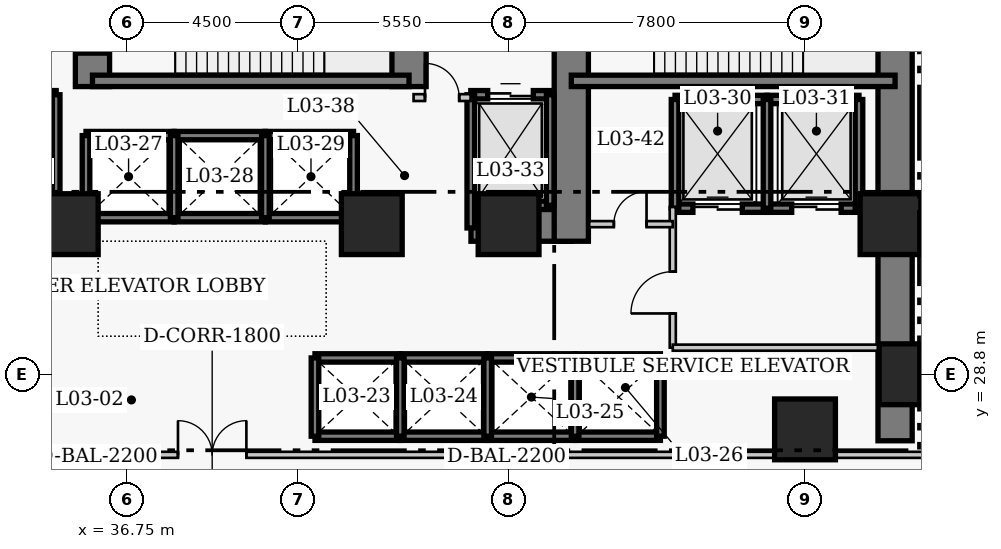
"""IFC4 building model, lengths in metres.
Left out: names, types, materials, properties, quantities, classifications, styles, units other than length and angle.
Written with IfcOpenShell. Run it as: python <this file> out.ifc"""

import sys

from ifc_helpers import new_model, si_unit, direction, frame, frame_2d, origin, origin_2d, place, context, subcontext, project, spatial, rectangle, extrude, element, fill, save


model = new_model("IFC4")
c1 = context("Model", 3, precision=1e-05, world=origin(), true_north=direction((0.0, 1.0)))
c2 = subcontext(c1, "Body", "Model", "MODEL_VIEW")
j1 = project(units=[si_unit("LENGTHUNIT", "METRE"), si_unit("PLANEANGLEUNIT", "RADIAN")], contexts=[c1])
p1 = place(None, origin())
s1 = spatial("IfcSite", under=j1, at=p1, CompositionType="ELEMENT")
p2 = place(p1, origin())
s2 = spatial("IfcBuilding", under=s1, at=p2, CompositionType="ELEMENT")
p3 = place(p2, frame((0.0, 0.0, 15.8)))
s3 = spatial("IfcBuildingStorey", under=s2, at=p3, CompositionType="ELEMENT", Elevation=15.8)
p4 = place(p3, frame((56.97, 27.05, 0.0), z_axis=(0.0, 0.0, 1.0), x_axis=(0.0, 1.0, 0.0)))
e1 = element("IfcWall", 1, at=p4, inside=s3, PredefinedType="SHEAR", context=c2, shape_type="SweptSolid", body=[
    extrude(rectangle(XDim=13.72, YDim=0.9, at=frame_2d((6.86, 0.0))), origin(), (0.0, 0.0, 1.0), 5.0),
])
p5 = place(p3, frame((45.81, 32.75, 0.0), z_axis=(0.0, 0.0, 1.0), x_axis=(1.0, 0.0, 0.0)))
e2 = element("IfcWall", 2, at=p5, inside=s3, PredefinedType="SHEAR", context=c2, shape_type="SweptSolid", body=[
    extrude(rectangle(XDim=2.64, YDim=0.9, at=frame_2d((1.32, 0.0))), origin(), (0.0, 0.0, 1.0), 5.0),
])
p6 = place(p3, frame((35.85, 36.37, 0.0), z_axis=(0.0, 0.0, 1.0), x_axis=(0.0, 1.0, 0.0)))
e3 = element("IfcWall", 3, at=p6, inside=s3, PredefinedType="SHEAR", context=c2, shape_type="SweptSolid", body=[
    extrude(rectangle(XDim=3.95, YDim=0.9, at=frame_2d((1.975, 0.0))), origin(), (0.0, 0.0, 1.0), 5.0),
])
p7 = place(p6, frame((0.88, 0.0, 0.0)))
e4 = element("IfcOpeningElement", 4, at=p7, cuts=e3, PredefinedType="OPENING", context=c2, shape_type="SweptSolid", body=[
    extrude(rectangle(XDim=1.1, YDim=2.15, at=frame_2d((0.55, 1.075))), frame((0.0, 0.46, 0.0), z_axis=(0.0, -1.0, 0.0), x_axis=(1.0, 0.0, 0.0)), (0.0, 0.0, 1.0), 0.92),
])
p8 = place(p3, frame((44.18, 36.37, 0.0), z_axis=(0.0, 0.0, 1.0), x_axis=(0.0, 1.0, 0.0)))
e5 = element("IfcWall", 5, at=p8, inside=s3, PredefinedType="SHEAR", context=c2, shape_type="SweptSolid", body=[
    extrude(rectangle(XDim=3.95, YDim=0.9, at=frame_2d((1.975, 0.0))), origin(), (0.0, 0.0, 1.0), 5.0),
])
p9 = place(p3, frame((48.45, 32.3, 0.0), z_axis=(0.0, 0.0, 1.0), x_axis=(0.0, 1.0, 0.0)))
e6 = element("IfcWall", 6, at=p9, inside=s3, PredefinedType="SHEAR", context=c2, shape_type="SweptSolid", body=[
    extrude(rectangle(XDim=8.02, YDim=0.9, at=frame_2d((4.01, 0.0))), origin(), (0.0, 0.0, 1.0), 5.0),
])
p10 = place(p9, frame((5.9, 0.0, 0.0)))
e7 = element("IfcOpeningElement", 7, at=p10, cuts=e6, PredefinedType="OPENING", context=c2, shape_type="SweptSolid", body=[
    extrude(rectangle(XDim=1.1, YDim=2.15, at=frame_2d((0.55, 1.075))), frame((0.0, 0.46, 0.0), z_axis=(0.0, -1.0, 0.0), x_axis=(1.0, 0.0, 0.0)), (0.0, 0.0, 1.0), 0.92),
])
p11 = place(p3, frame((35.85, 36.52, 0.0), z_axis=(0.0, 0.0, 1.0), x_axis=(1.0, 0.0, 0.0)))
e8 = element("IfcWall", 8, at=p11, inside=s3, PredefinedType="SHEAR", context=c2, shape_type="SweptSolid", body=[
    extrude(rectangle(XDim=8.33, YDim=0.3, at=frame_2d((4.165, 0.0))), origin(), (0.0, 0.0, 1.0), 5.0),
])
p12 = place(p3, frame((48.45, 36.52, 0.0), z_axis=(0.0, 0.0, 1.0), x_axis=(1.0, 0.0, 0.0)))
e9 = element("IfcWall", 9, at=p12, inside=s3, PredefinedType="SHEAR", context=c2, shape_type="SweptSolid", body=[
    extrude(rectangle(XDim=8.52, YDim=0.3, at=frame_2d((4.26, 0.0))), origin(), (0.0, 0.0, 1.0), 5.0),
])
for number, where, z_axis, x_axis in (
    (10, (57.35, 28.8, 0.0), (0.0, 0.0, 1.0), (1.0, 0.0, 0.0)),
    (11, (35.2, 32.75, 0.0), (0.0, 0.0, 1.0), (1.0, 0.0, 0.0)),
    (12, (43.2, 32.75, 0.0), (0.0, 0.0, 1.0), (1.0, 0.0, 0.0)),
    (13, (46.8, 32.75, 0.0), (0.0, 0.0, 1.0), (1.0, 0.0, 0.0)),
    (14, (54.6, 27.35, 0.0), (0.0, 0.0, 1.0), (1.0, 0.0, 0.0)),
    (15, (56.85, 32.75, 0.0), (0.0, 0.0, 1.0), (1.0, 0.0, 0.0)),
):
    element("IfcColumn", number, at=place(p3, frame(where, z_axis=z_axis, x_axis=x_axis)), inside=s3, PredefinedType="COLUMN", context=c2, shape_type="SweptSolid", body=[
        extrude(rectangle(XDim=1.6, YDim=1.6, at=origin_2d()), origin(), (0.0, 0.0, 1.0), 5.0),
    ])
for number, where, z_axis, x_axis in (
    (16, (41.705, 29.23, 0.0), (0.0, 0.0, 1.0), (1.0, 0.0, 0.0)),
    (17, (41.705, 27.17, 0.0), (0.0, 0.0, 1.0), (1.0, 0.0, 0.0)),
):
    element("IfcWall", number, at=place(p3, frame(where, z_axis=z_axis, x_axis=x_axis)), inside=s3, PredefinedType="SHEAR", context=c2, shape_type="SweptSolid", body=[
        extrude(rectangle(XDim=2.245, YDim=0.22, at=frame_2d((1.123, 0.0))), origin(), (0.0, 0.0, 1.0), 5.0),
    ])
p13 = place(p3, frame((41.705, 27.17, 0.0), z_axis=(0.0, 0.0, 1.0), x_axis=(0.0, 1.0, 0.0)))
e18 = element("IfcWall", 18, at=p13, inside=s3, PredefinedType="SHEAR", context=c2, shape_type="SweptSolid", body=[
    extrude(rectangle(XDim=2.06, YDim=0.2, at=frame_2d((1.03, 0.0))), origin(), (0.0, 0.0, 1.0), 5.0),
])
for number, where, z_axis, x_axis in (
    (19, (43.95, 29.23, 0.0), (0.0, 0.0, 1.0), (1.0, 0.0, 0.0)),
    (20, (43.95, 27.17, 0.0), (0.0, 0.0, 1.0), (1.0, 0.0, 0.0)),
):
    element("IfcWall", number, at=place(p3, frame(where, z_axis=z_axis, x_axis=x_axis)), inside=s3, PredefinedType="SHEAR", context=c2, shape_type="SweptSolid", body=[
        extrude(rectangle(XDim=2.3, YDim=0.22, at=frame_2d((1.15, 0.0))), origin(), (0.0, 0.0, 1.0), 5.0),
    ])
p14 = place(p3, frame((43.95, 27.17, 0.0), z_axis=(0.0, 0.0, 1.0), x_axis=(0.0, 1.0, 0.0)))
e21 = element("IfcWall", 21, at=p14, inside=s3, PredefinedType="SHEAR", context=c2, shape_type="SweptSolid", body=[
    extrude(rectangle(XDim=2.06, YDim=0.2, at=frame_2d((1.03, 0.0))), origin(), (0.0, 0.0, 1.0), 5.0),
])
for number, where, z_axis, x_axis in (
    (22, (46.25, 29.23, 0.0), (0.0, 0.0, 1.0), (1.0, 0.0, 0.0)),
    (23, (46.25, 27.17, 0.0), (0.0, 0.0, 1.0), (1.0, 0.0, 0.0)),
):
    element("IfcWall", number, at=place(p3, frame(where, z_axis=z_axis, x_axis=x_axis)), inside=s3, PredefinedType="SHEAR", context=c2, shape_type="SweptSolid", body=[
        extrude(rectangle(XDim=2.3, YDim=0.22, at=frame_2d((1.15, 0.0))), origin(), (0.0, 0.0, 1.0), 5.0),
    ])
p15 = place(p3, frame((46.25, 27.17, 0.0), z_axis=(0.0, 0.0, 1.0), x_axis=(0.0, 1.0, 0.0)))
e24 = element("IfcWall", 24, at=p15, inside=s3, PredefinedType="SHEAR", context=c2, shape_type="SweptSolid", body=[
    extrude(rectangle(XDim=2.06, YDim=0.2, at=frame_2d((1.03, 0.0))), origin(), (0.0, 0.0, 1.0), 5.0),
])
for number, where, z_axis, x_axis in (
    (25, (48.55, 29.23, 0.0), (0.0, 0.0, 1.0), (1.0, 0.0, 0.0)),
    (26, (48.55, 27.17, 0.0), (0.0, 0.0, 1.0), (1.0, 0.0, 0.0)),
):
    element("IfcWall", number, at=place(p3, frame(where, z_axis=z_axis, x_axis=x_axis)), inside=s3, PredefinedType="SHEAR", context=c2, shape_type="SweptSolid", body=[
        extrude(rectangle(XDim=2.245, YDim=0.22, at=frame_2d((1.123, 0.0))), origin(), (0.0, 0.0, 1.0), 5.0),
    ])
for number, where, z_axis, x_axis in (
    (27, (48.55, 27.17, 0.0), (0.0, 0.0, 1.0), (0.0, 1.0, 0.0)),
    (28, (50.795, 27.17, 0.0), (0.0, 0.0, 1.0), (0.0, 1.0, 0.0)),
):
    element("IfcWall", number, at=place(p3, frame(where, z_axis=z_axis, x_axis=x_axis)), inside=s3, PredefinedType="SHEAR", context=c2, shape_type="SweptSolid", body=[
        extrude(rectangle(XDim=2.06, YDim=0.2, at=frame_2d((1.03, 0.0))), origin(), (0.0, 0.0, 1.0), 5.0),
    ])
for number, where, z_axis, x_axis in (
    (29, (35.68, 35.08, 0.0), (0.0, 0.0, 1.0), (1.0, 0.0, 0.0)),
    (30, (35.68, 32.92, 0.0), (0.0, 0.0, 1.0), (1.0, 0.0, 0.0)),
):
    element("IfcWall", number, at=place(p3, frame(where, z_axis=z_axis, x_axis=x_axis)), inside=s3, PredefinedType="SHEAR", context=c2, shape_type="SweptSolid", body=[
        extrude(rectangle(XDim=2.32, YDim=0.22, at=frame_2d((1.16, 0.0))), origin(), (0.0, 0.0, 1.0), 5.0),
    ])
p16 = place(p3, frame((35.68, 32.92, 0.0), z_axis=(0.0, 0.0, 1.0), x_axis=(0.0, 1.0, 0.0)))
e31 = element("IfcWall", 31, at=p16, inside=s3, PredefinedType="SHEAR", context=c2, shape_type="SweptSolid", body=[
    extrude(rectangle(XDim=2.16, YDim=0.2, at=frame_2d((1.08, 0.0))), origin(), (0.0, 0.0, 1.0), 5.0),
])
for number, where, z_axis, x_axis in (
    (32, (38.0, 35.08, 0.0), (0.0, 0.0, 1.0), (1.0, 0.0, 0.0)),
    (33, (38.0, 32.92, 0.0), (0.0, 0.0, 1.0), (1.0, 0.0, 0.0)),
):
    element("IfcWall", number, at=place(p3, frame(where, z_axis=z_axis, x_axis=x_axis)), inside=s3, PredefinedType="SHEAR", context=c2, shape_type="SweptSolid", body=[
        extrude(rectangle(XDim=2.4, YDim=0.22, at=frame_2d((1.2, 0.0))), origin(), (0.0, 0.0, 1.0), 5.0),
    ])
p17 = place(p3, frame((38.0, 32.92, 0.0), z_axis=(0.0, 0.0, 1.0), x_axis=(0.0, 1.0, 0.0)))
e34 = element("IfcWall", 34, at=p17, inside=s3, PredefinedType="SHEAR", context=c2, shape_type="SweptSolid", body=[
    extrude(rectangle(XDim=2.16, YDim=0.2, at=frame_2d((1.08, 0.0))), origin(), (0.0, 0.0, 1.0), 5.0),
])
for number, where, z_axis, x_axis in (
    (35, (40.4, 35.08, 0.0), (0.0, 0.0, 1.0), (1.0, 0.0, 0.0)),
    (36, (40.4, 32.92, 0.0), (0.0, 0.0, 1.0), (1.0, 0.0, 0.0)),
):
    element("IfcWall", number, at=place(p3, frame(where, z_axis=z_axis, x_axis=x_axis)), inside=s3, PredefinedType="SHEAR", context=c2, shape_type="SweptSolid", body=[
        extrude(rectangle(XDim=2.32, YDim=0.22, at=frame_2d((1.16, 0.0))), origin(), (0.0, 0.0, 1.0), 5.0),
    ])
for number, where, z_axis, x_axis in (
    (37, (40.4, 32.92, 0.0), (0.0, 0.0, 1.0), (0.0, 1.0, 0.0)),
    (38, (42.72, 32.92, 0.0), (0.0, 0.0, 1.0), (0.0, 1.0, 0.0)),
):
    element("IfcWall", number, at=place(p3, frame(where, z_axis=z_axis, x_axis=x_axis)), inside=s3, PredefinedType="SHEAR", context=c2, shape_type="SweptSolid", body=[
        extrude(rectangle(XDim=2.16, YDim=0.2, at=frame_2d((1.08, 0.0))), origin(), (0.0, 0.0, 1.0), 5.0),
    ])
p18 = place(p3, frame((51.18, 36.03, 0.0), z_axis=(0.0, 0.0, 1.0), x_axis=(1.0, 0.0, 0.0)))
e39 = element("IfcWall", 39, at=p18, inside=s3, PredefinedType="SHEAR", context=c2, shape_type="SweptSolid", body=[
    extrude(rectangle(XDim=2.42, YDim=0.22, at=frame_2d((1.21, 0.0))), origin(), (0.0, 0.0, 1.0), 5.0),
])
p19 = place(p3, frame((51.18, 33.17, 0.0), z_axis=(0.0, 0.0, 1.0), x_axis=(1.0, 0.0, 0.0)))
e40 = element("IfcWall", 40, at=p19, inside=s3, PredefinedType="SHEAR", context=c2, shape_type="SweptSolid", body=[
    extrude(rectangle(XDim=2.42, YDim=0.22, at=frame_2d((1.21, 0.0))), origin(), (0.0, 0.0, 1.0), 5.0),
])
p20 = place(p19, frame((0.47, 0.0, 0.0)))
e41 = element("IfcOpeningElement", 41, at=p20, cuts=e40, PredefinedType="OPENING", context=c2, shape_type="SweptSolid", body=[
    extrude(rectangle(XDim=1.3, YDim=2.15, at=frame_2d((0.65, 1.075))), frame((0.0, 0.12, 0.0), z_axis=(0.0, -1.0, 0.0), x_axis=(1.0, 0.0, 0.0)), (0.0, 0.0, 1.0), 0.24),
])
p21 = place(p3, frame((51.18, 33.17, 0.0), z_axis=(0.0, 0.0, 1.0), x_axis=(0.0, 1.0, 0.0)))
e42 = element("IfcWall", 42, at=p21, inside=s3, PredefinedType="SHEAR", context=c2, shape_type="SweptSolid", body=[
    extrude(rectangle(XDim=2.86, YDim=0.2, at=frame_2d((1.43, 0.0))), origin(), (0.0, 0.0, 1.0), 5.0),
])
p22 = place(p3, frame((53.6, 36.03, 0.0), z_axis=(0.0, 0.0, 1.0), x_axis=(1.0, 0.0, 0.0)))
e43 = element("IfcWall", 43, at=p22, inside=s3, PredefinedType="SHEAR", context=c2, shape_type="SweptSolid", body=[
    extrude(rectangle(XDim=2.42, YDim=0.22, at=frame_2d((1.21, 0.0))), origin(), (0.0, 0.0, 1.0), 5.0),
])
p23 = place(p3, frame((53.6, 33.17, 0.0), z_axis=(0.0, 0.0, 1.0), x_axis=(1.0, 0.0, 0.0)))
e44 = element("IfcWall", 44, at=p23, inside=s3, PredefinedType="SHEAR", context=c2, shape_type="SweptSolid", body=[
    extrude(rectangle(XDim=2.42, YDim=0.22, at=frame_2d((1.21, 0.0))), origin(), (0.0, 0.0, 1.0), 5.0),
])
p24 = place(p23, frame((0.65, 0.0, 0.0)))
e45 = element("IfcOpeningElement", 45, at=p24, cuts=e44, PredefinedType="OPENING", context=c2, shape_type="SweptSolid", body=[
    extrude(rectangle(XDim=1.3, YDim=2.15, at=frame_2d((0.65, 1.075))), frame((0.0, 0.12, 0.0), z_axis=(0.0, -1.0, 0.0), x_axis=(1.0, 0.0, 0.0)), (0.0, 0.0, 1.0), 0.24),
])
for number, where, z_axis, x_axis in (
    (46, (53.6, 33.17, 0.0), (0.0, 0.0, 1.0), (0.0, 1.0, 0.0)),
    (47, (56.02, 33.17, 0.0), (0.0, 0.0, 1.0), (0.0, 1.0, 0.0)),
):
    element("IfcWall", number, at=place(p3, frame(where, z_axis=z_axis, x_axis=x_axis)), inside=s3, PredefinedType="SHEAR", context=c2, shape_type="SweptSolid", body=[
        extrude(rectangle(XDim=2.86, YDim=0.2, at=frame_2d((1.43, 0.0))), origin(), (0.0, 0.0, 1.0), 5.0),
    ])
p25 = place(p3, frame((32.805, 36.155, 0.0), z_axis=(0.0, 0.0, 1.0), x_axis=(1.0, 0.0, 0.0)))
e48 = element("IfcWall", 48, at=p25, inside=s3, PredefinedType="SHEAR", context=c2, shape_type="SweptSolid", body=[
    extrude(rectangle(XDim=2.09, YDim=0.22, at=frame_2d((1.045, 0.0))), origin(), (0.0, 0.0, 1.0), 5.0),
])
p26 = place(p25, frame((0.445, 0.0, 0.0)))
e49 = element("IfcOpeningElement", 49, at=p26, cuts=e48, PredefinedType="OPENING", context=c2, shape_type="SweptSolid", body=[
    extrude(rectangle(XDim=1.2, YDim=2.15, at=frame_2d((0.6, 1.075))), frame((0.0, 0.12, 0.0), z_axis=(0.0, -1.0, 0.0), x_axis=(1.0, 0.0, 0.0)), (0.0, 0.0, 1.0), 0.24),
])
p27 = place(p3, frame((32.805, 33.245, 0.0), z_axis=(0.0, 0.0, 1.0), x_axis=(1.0, 0.0, 0.0)))
e50 = element("IfcWall", 50, at=p27, inside=s3, PredefinedType="SHEAR", context=c2, shape_type="SweptSolid", body=[
    extrude(rectangle(XDim=2.09, YDim=0.22, at=frame_2d((1.045, 0.0))), origin(), (0.0, 0.0, 1.0), 5.0),
])
p28 = place(p3, frame((34.895, 33.245, 0.0), z_axis=(0.0, 0.0, 1.0), x_axis=(0.0, 1.0, 0.0)))
e51 = element("IfcWall", 51, at=p28, inside=s3, PredefinedType="SHEAR", context=c2, shape_type="SweptSolid", body=[
    extrude(rectangle(XDim=2.91, YDim=0.2, at=frame_2d((1.455, 0.0))), origin(), (0.0, 0.0, 1.0), 5.0),
])
p29 = place(p3, frame((45.805, 36.155, 0.0), z_axis=(0.0, 0.0, 1.0), x_axis=(1.0, 0.0, 0.0)))
e52 = element("IfcWall", 52, at=p29, inside=s3, PredefinedType="SHEAR", context=c2, shape_type="SweptSolid", body=[
    extrude(rectangle(XDim=2.09, YDim=0.22, at=frame_2d((1.045, 0.0))), origin(), (0.0, 0.0, 1.0), 5.0),
])
p30 = place(p29, frame((0.445, 0.0, 0.0)))
e53 = element("IfcOpeningElement", 53, at=p30, cuts=e52, PredefinedType="OPENING", context=c2, shape_type="SweptSolid", body=[
    extrude(rectangle(XDim=1.2, YDim=2.15, at=frame_2d((0.6, 1.075))), frame((0.0, 0.12, 0.0), z_axis=(0.0, -1.0, 0.0), x_axis=(1.0, 0.0, 0.0)), (0.0, 0.0, 1.0), 0.24),
])
p31 = place(p3, frame((45.805, 33.245, 0.0), z_axis=(0.0, 0.0, 1.0), x_axis=(1.0, 0.0, 0.0)))
e54 = element("IfcWall", 54, at=p31, inside=s3, PredefinedType="SHEAR", context=c2, shape_type="SweptSolid", body=[
    extrude(rectangle(XDim=2.09, YDim=0.22, at=frame_2d((1.045, 0.0))), origin(), (0.0, 0.0, 1.0), 5.0),
])
p32 = place(p3, frame((45.805, 32.65, 0.0), z_axis=(0.0, 0.0, 1.0), x_axis=(0.0, 1.0, 0.0)))
e55 = element("IfcWall", 55, at=p32, inside=s3, PredefinedType="SHEAR", context=c2, shape_type="SweptSolid", body=[
    extrude(rectangle(XDim=3.505, YDim=0.2, at=frame_2d((1.752, 0.0))), origin(), (0.0, 0.0, 1.0), 5.0),
])
p33 = place(p3, frame((47.895, 33.245, 0.0), z_axis=(0.0, 0.0, 1.0), x_axis=(0.0, 1.0, 0.0)))
e56 = element("IfcWall", 56, at=p33, inside=s3, PredefinedType="SHEAR", context=c2, shape_type="SweptSolid", body=[
    extrude(rectangle(XDim=2.91, YDim=0.2, at=frame_2d((1.455, 0.0))), origin(), (0.0, 0.0, 1.0), 5.0),
])
p34 = place(p3, frame((44.3, 36.08, 0.0), z_axis=(0.0, 0.0, 1.0), x_axis=(1.0, 0.0, 0.0)))
e57 = element("IfcWall", 57, at=p34, inside=s3, PredefinedType="PARTITIONING", context=c2, shape_type="SweptSolid", body=[
    extrude(rectangle(XDim=1.5, YDim=0.18, at=frame_2d((0.75, 0.0))), origin(), (0.0, 0.0, 1.0), 4.58),
])
p35 = place(p34, frame((0.3, 0.0, 0.0)))
e58 = element("IfcOpeningElement", 58, at=p35, cuts=e57, PredefinedType="OPENING", context=c2, shape_type="SweptSolid", body=[
    extrude(rectangle(XDim=0.9, YDim=2.15, at=frame_2d((0.45, 1.075))), frame((0.0, 0.1, 0.0), z_axis=(0.0, -1.0, 0.0), x_axis=(1.0, 0.0, 0.0)), (0.0, 0.0, 1.0), 0.2),
])
p36 = place(p3, frame((51.12, 29.5, 0.0), z_axis=(0.0, 0.0, 1.0), x_axis=(0.0, 1.0, 0.0)))
e59 = element("IfcWall", 59, at=p36, inside=s3, PredefinedType="PARTITIONING", context=c2, shape_type="SweptSolid", body=[
    extrude(rectangle(XDim=3.7, YDim=0.16, at=frame_2d((1.85, 0.0))), origin(), (0.0, 0.0, 1.0), 4.58),
])
p37 = place(p36, frame((0.9, 0.0, 0.0)))
e60 = element("IfcOpeningElement", 60, at=p37, cuts=e59, PredefinedType="OPENING", context=c2, shape_type="SweptSolid", body=[
    extrude(rectangle(XDim=1.1, YDim=2.15, at=frame_2d((0.55, 1.075))), frame((0.0, 0.09, 0.0), z_axis=(0.0, -1.0, 0.0), x_axis=(1.0, 0.0, 0.0)), (0.0, 0.0, 1.0), 0.18),
])
p38 = place(p3, frame((51.12, 29.5, 0.0), z_axis=(0.0, 0.0, 1.0), x_axis=(1.0, 0.0, 0.0)))
e61 = element("IfcWall", 61, at=p38, inside=s3, PredefinedType="PARTITIONING", context=c2, shape_type="SweptSolid", body=[
    extrude(rectangle(XDim=5.63, YDim=0.16, at=frame_2d((2.815, 0.0))), origin(), (0.0, 0.0, 1.0), 4.58),
])
p39 = place(p3, frame((48.92, 32.75, 0.0), z_axis=(0.0, 0.0, 1.0), x_axis=(1.0, 0.0, 0.0)))
e62 = element("IfcWall", 62, at=p39, inside=s3, PredefinedType="PARTITIONING", context=c2, shape_type="SweptSolid", body=[
    extrude(rectangle(XDim=2.2, YDim=0.16, at=frame_2d((1.1, 0.0))), origin(), (0.0, 0.0, 1.0), 4.58),
])
p40 = place(p39, frame((0.65, 0.0, 0.0)))
e63 = element("IfcOpeningElement", 63, at=p40, cuts=e62, PredefinedType="OPENING", context=c2, shape_type="SweptSolid", body=[
    extrude(rectangle(XDim=0.86, YDim=2.05, at=frame_2d((0.43, 1.025))), frame((0.0, 0.09, 0.0), z_axis=(0.0, -1.0, 0.0), x_axis=(1.0, 0.0, 0.0)), (0.0, 0.0, 1.0), 0.18),
])
p41 = place(p3, frame((-2.98, 26.68, 0.0), z_axis=(0.0, 0.0, 1.0), x_axis=(1.0, 0.0, 0.0)))
e64 = element("IfcWall", 64, at=p41, inside=s3, PredefinedType="PARTITIONING", context=c2, shape_type="SweptSolid", body=[
    extrude(rectangle(XDim=83.96, YDim=0.16, at=frame_2d((41.98, 0.0))), origin(), (0.0, 0.0, 1.0), 4.58),
])
p42 = place(p41, frame((41.08, 0.0, 0.0)))
e65 = element("IfcOpeningElement", 65, at=p42, cuts=e64, PredefinedType="OPENING", context=c2, shape_type="SweptSolid", body=[
    extrude(rectangle(XDim=1.8, YDim=2.2, at=frame_2d((0.9, 1.1))), frame((0.0, 0.09, 0.0), z_axis=(0.0, -1.0, 0.0), x_axis=(1.0, 0.0, 0.0)), (0.0, 0.0, 1.0), 0.18),
])
p43 = place(p41, frame((4.042, 0.0, 0.0)))
e66 = element("IfcOpeningElement", 66, at=p43, cuts=e64, PredefinedType="OPENING", context=c2, shape_type="SweptSolid", body=[
    extrude(rectangle(XDim=1.8, YDim=2.2, at=frame_2d((0.9, 1.1))), frame((0.0, 0.09, 0.0), z_axis=(0.0, -1.0, 0.0), x_axis=(1.0, 0.0, 0.0)), (0.0, 0.0, 1.0), 0.18),
])
p44 = place(p41, frame((61.48, 0.0, 0.0)))
e67 = element("IfcOpeningElement", 67, at=p44, cuts=e64, PredefinedType="OPENING", context=c2, shape_type="SweptSolid", body=[
    extrude(rectangle(XDim=1.8, YDim=2.2, at=frame_2d((0.9, 1.1))), frame((0.0, 0.09, 0.0), z_axis=(0.0, -1.0, 0.0), x_axis=(1.0, 0.0, 0.0)), (0.0, 0.0, 1.0), 0.18),
])
p45 = place(p20, origin())
e68 = element("IfcDoor", 68, at=p45, inside=s3, OperationType="DOUBLE_DOOR_SLIDING", PredefinedType="DOOR", context=c2, shape_type="SweptSolid", body=[
    extrude(rectangle(XDim=1.3, YDim=2.15, at=frame_2d((0.65, 1.075))), frame((0.0, 0.025, 0.0), z_axis=(0.0, -1.0, 0.0), x_axis=(1.0, 0.0, 0.0)), (0.0, 0.0, 1.0), 0.05),
])
fill(e41, e68)
p46 = place(p24, origin())
e69 = element("IfcDoor", 69, at=p46, inside=s3, OperationType="DOUBLE_DOOR_SLIDING", PredefinedType="DOOR", context=c2, shape_type="SweptSolid", body=[
    extrude(rectangle(XDim=1.3, YDim=2.15, at=frame_2d((0.65, 1.075))), frame((0.0, 0.025, 0.0), z_axis=(0.0, -1.0, 0.0), x_axis=(1.0, 0.0, 0.0)), (0.0, 0.0, 1.0), 0.05),
])
fill(e45, e69)
p47 = place(p30, origin())
e70 = element("IfcDoor", 70, at=p47, inside=s3, OperationType="DOUBLE_DOOR_SLIDING", PredefinedType="DOOR", context=c2, shape_type="SweptSolid", body=[
    extrude(rectangle(XDim=1.2, YDim=2.15, at=frame_2d((0.6, 1.075))), frame((0.0, 0.025, 0.0), z_axis=(0.0, -1.0, 0.0), x_axis=(1.0, 0.0, 0.0)), (0.0, 0.0, 1.0), 0.05),
])
fill(e53, e70)
p48 = place(p35, origin())
e71 = element("IfcDoor", 71, at=p48, inside=s3, OperationType="SINGLE_SWING_LEFT", PredefinedType="DOOR", context=c2, shape_type="SweptSolid", body=[
    extrude(rectangle(XDim=0.9, YDim=2.15, at=frame_2d((0.45, 1.075))), frame((0.0, 0.025, 0.0), z_axis=(0.0, -1.0, 0.0), x_axis=(1.0, 0.0, 0.0)), (0.0, 0.0, 1.0), 0.05),
])
fill(e58, e71)
p49 = place(p37, origin())
e72 = element("IfcDoor", 72, at=p49, inside=s3, OperationType="SINGLE_SWING_LEFT", PredefinedType="DOOR", context=c2, shape_type="SweptSolid", body=[
    extrude(rectangle(XDim=1.1, YDim=2.15, at=frame_2d((0.55, 1.075))), frame((0.0, 0.025, 0.0), z_axis=(0.0, -1.0, 0.0), x_axis=(1.0, 0.0, 0.0)), (0.0, 0.0, 1.0), 0.05),
])
fill(e60, e72)
p50 = place(p40, origin())
e73 = element("IfcDoor", 73, at=p50, inside=s3, OperationType="SINGLE_SWING_RIGHT", PredefinedType="DOOR", context=c2, shape_type="SweptSolid", body=[
    extrude(rectangle(XDim=0.86, YDim=2.05, at=frame_2d((0.43, 1.025))), frame((0.0, 0.025, 0.0), z_axis=(0.0, -1.0, 0.0), x_axis=(1.0, 0.0, 0.0)), (0.0, 0.0, 1.0), 0.05),
])
fill(e63, e73)
p51 = place(p42, origin())
e74 = element("IfcDoor", 74, at=p51, inside=s3, OperationType="DOUBLE_DOOR_SINGLE_SWING", PredefinedType="DOOR", context=c2, shape_type="SweptSolid", body=[
    extrude(rectangle(XDim=1.8, YDim=2.2, at=frame_2d((0.9, 1.1))), frame((0.0, 0.025, 0.0), z_axis=(0.0, -1.0, 0.0), x_axis=(1.0, 0.0, 0.0)), (0.0, 0.0, 1.0), 0.05),
])
fill(e65, e74)
p52 = place(p7, origin())
e75 = element("IfcDoor", 75, at=p52, inside=s3, OperationType="SINGLE_SWING_RIGHT", PredefinedType="DOOR", context=c2, shape_type="SweptSolid", body=[
    extrude(rectangle(XDim=1.1, YDim=2.15, at=frame_2d((0.55, 1.075))), frame((0.0, 0.025, 0.0), z_axis=(0.0, -1.0, 0.0), x_axis=(1.0, 0.0, 0.0)), (0.0, 0.0, 1.0), 0.05),
])
fill(e4, e75)
save(model, sys.argv[1])
